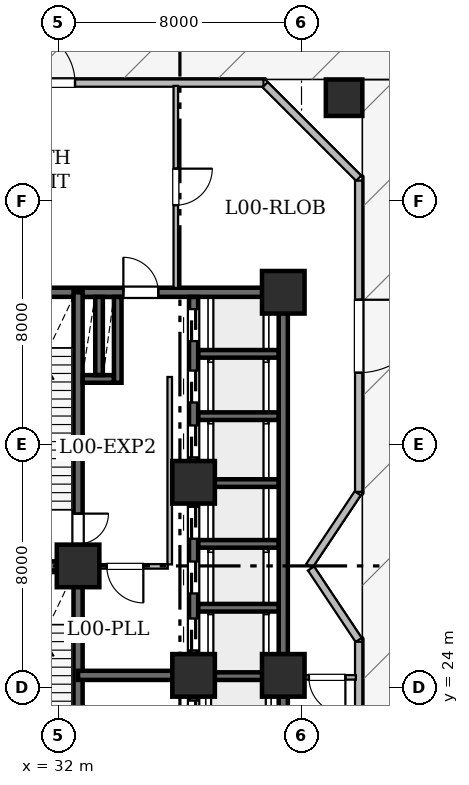
"""IFC4 building model, lengths in metres.
Left out: names, types, materials, properties, quantities, classifications, styles, units other than length and angle.
Written with IfcOpenShell. Run it as: python <this file> out.ifc"""

import sys

from ifc_helpers import new_model, si_unit, direction, frame, frame_2d, origin, origin_2d, place, context, subcontext, project, spatial, rectangle, hollow_rectangle, extrude, element, fill, save


model = new_model("IFC4")
c1 = context("Model", 3, precision=1e-05, world=origin(), true_north=direction((0.0, 1.0)))
c2 = subcontext(c1, "Body", "Model", "MODEL_VIEW")
j1 = project(units=[si_unit("LENGTHUNIT", "METRE"), si_unit("PLANEANGLEUNIT", "RADIAN")], contexts=[c1])
p1 = place(None, origin())
s1 = spatial("IfcSite", under=j1, at=p1, CompositionType="ELEMENT")
p2 = place(p1, origin())
s2 = spatial("IfcBuilding", under=s1, at=p2, CompositionType="ELEMENT")
p3 = place(p2, origin())
s3 = spatial("IfcBuildingStorey", under=s2, at=p3, CompositionType="ELEMENT", Elevation=0.0)
for number, where, z_axis, x_axis in (
    (1, (32.65, 28.0, 0.0), (0.0, 0.0, 1.0), (1.0, 0.0, 0.0)),
    (2, (36.45, 24.4, 0.0), (0.0, 0.0, 1.0), (1.0, 0.0, 0.0)),
    (3, (39.4, 24.4, 0.0), (0.0, 0.0, 1.0), (1.0, 0.0, 0.0)),
    (4, (36.45, 30.75, 0.0), (0.0, 0.0, 1.0), (1.0, 0.0, 0.0)),
    (5, (39.4, 37.0, 0.0), (0.0, 0.0, 1.0), (1.0, 0.0, 0.0)),
):
    element("IfcColumn", number, at=place(p3, frame(where, z_axis=z_axis, x_axis=x_axis)), inside=s3, PredefinedType="COLUMN", context=c2, shape_type="SweptSolid", body=[
        extrude(hollow_rectangle(XDim=1.4, YDim=1.4, WallThickness=0.07, at=origin_2d()), origin(), (0.0, 0.0, 1.0), 7.2),
    ])
p4 = place(p3, frame((41.4, 43.4, 0.0), z_axis=(0.0, 0.0, 1.0), x_axis=(1.0, 0.0, 0.0)))
e6 = element("IfcColumn", 6, at=p4, inside=s3, PredefinedType="COLUMN", context=c2, shape_type="SweptSolid", body=[
    extrude(hollow_rectangle(XDim=1.2, YDim=1.2, WallThickness=0.06, at=origin_2d()), origin(), (0.0, 0.0, 1.0), 7.2),
])
p5 = place(p3, frame((19.097, 43.88, 0.0), z_axis=(0.0, 0.0, 1.0), x_axis=(1.0, 0.0, 0.0)))
e7 = element("IfcWall", 7, at=p5, inside=s3, PredefinedType="STANDARD", context=c2, shape_type="SweptSolid", body=[
    extrude(rectangle(XDim=19.653, YDim=0.24, at=frame_2d((9.827, 0.0))), origin(), (0.0, 0.0, 1.0), 6.78),
])
p6 = place(p5, frame((11.653, 0.0, 0.0)))
e8 = element("IfcOpeningElement", 8, at=p6, cuts=e7, PredefinedType="OPENING", context=c2, shape_type="SweptSolid", body=[
    extrude(rectangle(XDim=1.8, YDim=2.2, at=frame_2d((0.9, 1.1))), frame((0.0, 0.13, 0.0), z_axis=(0.0, -1.0, 0.0), x_axis=(1.0, 0.0, 0.0)), (0.0, 0.0, 1.0), 0.26),
])
p7 = place(p5, frame((2.0, 0.0, 0.0)))
e9 = element("IfcOpeningElement", 9, at=p7, cuts=e7, PredefinedType="OPENING", context=c2, shape_type="SweptSolid", body=[
    extrude(rectangle(XDim=2.4, YDim=2.4, at=frame_2d((1.2, 1.2))), frame((0.0, 0.13, 0.0), z_axis=(0.0, -1.0, 0.0), x_axis=(1.0, 0.0, 0.0)), (0.0, 0.0, 1.0), 0.26),
])
p8 = place(p3, frame((38.803, 43.827, 0.0), z_axis=(0.0, 0.0, 1.0), x_axis=(0.707106781187, -0.707106781187, 0.0)))
e10 = element("IfcWall", 10, at=p8, inside=s3, PredefinedType="STANDARD", context=c2, shape_type="SweptSolid", body=[
    extrude(rectangle(XDim=4.351, YDim=0.24, at=frame_2d((2.176, 0.0))), origin(), (0.0, 0.0, 1.0), 6.78),
])
p9 = place(p3, frame((41.88, 40.672, 0.0), z_axis=(0.0, 0.0, 1.0), x_axis=(0.0, -1.0, 0.0)))
e11 = element("IfcWall", 11, at=p9, inside=s3, PredefinedType="STANDARD", context=c2, shape_type="SweptSolid", body=[
    extrude(rectangle(XDim=10.236, YDim=0.24, at=frame_2d((5.118, 0.0))), origin(), (0.0, 0.0, 1.0), 6.78),
])
p10 = place(p9, frame((3.918, 0.0, 0.0)))
e12 = element("IfcOpeningElement", 12, at=p10, cuts=e11, PredefinedType="OPENING", context=c2, shape_type="SweptSolid", body=[
    extrude(rectangle(XDim=2.4, YDim=2.4, at=frame_2d((1.2, 1.2))), frame((0.0, 0.13, 0.0), z_axis=(0.0, -1.0, 0.0), x_axis=(1.0, 0.0, 0.0)), (0.0, 0.0, 1.0), 0.26),
])
p11 = place(p3, frame((41.848, 30.388, 0.0), z_axis=(0.0, 0.0, 1.0), x_axis=(-0.55466093221, -0.83207646901, 0.0)))
e13 = element("IfcWall", 13, at=p11, inside=s3, PredefinedType="STANDARD", context=c2, shape_type="SweptSolid", body=[
    extrude(rectangle(XDim=2.87, YDim=0.24, at=frame_2d((1.435, 0.0))), origin(), (0.0, 0.0, 1.0), 6.78),
])
p12 = place(p3, frame((40.312, 27.916, 0.0), z_axis=(0.0, 0.0, 1.0), x_axis=(0.554660333073, -0.832076868394, 0.0)))
e14 = element("IfcWall", 14, at=p12, inside=s3, PredefinedType="STANDARD", context=c2, shape_type="SweptSolid", body=[
    extrude(rectangle(XDim=2.827, YDim=0.24, at=frame_2d((1.413, 0.0))), origin(), (0.0, 0.0, 1.0), 6.78),
])
p13 = place(p3, frame((41.88, 25.506, 0.0), z_axis=(0.0, 0.0, 1.0), x_axis=(0.0, -1.0, 0.0)))
e15 = element("IfcWall", 15, at=p13, inside=s3, PredefinedType="STANDARD", context=c2, shape_type="SweptSolid", body=[
    extrude(rectangle(XDim=10.256, YDim=0.24, at=frame_2d((5.128, 0.0))), origin(), (0.0, 0.0, 1.0), 6.78),
])
p14 = place(p3, frame((29.0, 37.0, 0.0), z_axis=(0.0, 0.0, 1.0), x_axis=(1.0, 0.0, 0.0)))
e16 = element("IfcWall", 16, at=p14, inside=s3, PredefinedType="SHEAR", context=c2, shape_type="SweptSolid", body=[
    extrude(rectangle(XDim=10.4, YDim=0.3, at=frame_2d((5.2, 0.0))), origin(), (0.0, 0.0, 1.0), 6.78),
])
p15 = place(p14, frame((5.14, 0.0, 0.0)))
e17 = element("IfcOpeningElement", 17, at=p15, cuts=e16, PredefinedType="OPENING", context=c2, shape_type="SweptSolid", body=[
    extrude(rectangle(XDim=1.15, YDim=2.2, at=frame_2d((0.575, 1.1))), frame((0.0, 0.16, 0.0), z_axis=(0.0, -1.0, 0.0), x_axis=(1.0, 0.0, 0.0)), (0.0, 0.0, 1.0), 0.32),
])
p16 = place(p3, frame((39.4, 19.0, 0.0), z_axis=(0.0, 0.0, 1.0), x_axis=(0.0, 1.0, 0.0)))
e18 = element("IfcWall", 18, at=p16, inside=s3, PredefinedType="SHEAR", context=c2, shape_type="SweptSolid", body=[
    extrude(rectangle(XDim=5.4, YDim=0.3, at=frame_2d((2.7, 0.0))), origin(), (0.0, 0.0, 1.0), 6.78),
])
p17 = place(p3, frame((39.4, 24.4, 0.0), z_axis=(0.0, 0.0, 1.0), x_axis=(0.0, 1.0, 0.0)))
e19 = element("IfcWall", 19, at=p17, inside=s3, PredefinedType="SHEAR", context=c2, shape_type="SweptSolid", body=[
    extrude(rectangle(XDim=12.6, YDim=0.3, at=frame_2d((6.3, 0.0))), origin(), (0.0, 0.0, 1.0), 6.78),
])
p18 = place(p3, frame((32.65, 28.0, 0.0), z_axis=(0.0, 0.0, 1.0), x_axis=(0.0, -1.0, 0.0)))
e20 = element("IfcWall", 20, at=p18, inside=s3, PredefinedType="SHEAR", context=c2, shape_type="SweptSolid", body=[
    extrude(rectangle(XDim=9.0, YDim=0.3, at=frame_2d((4.5, 0.0))), origin(), (0.0, 0.0, 1.0), 6.78),
])
p19 = place(p18, frame((7.28, 0.0, 0.0)))
e21 = element("IfcOpeningElement", 21, at=p19, cuts=e20, PredefinedType="OPENING", context=c2, shape_type="SweptSolid", body=[
    extrude(rectangle(XDim=1.0, YDim=2.15, at=frame_2d((0.5, 1.075))), frame((0.0, 0.16, 0.0), z_axis=(0.0, -1.0, 0.0), x_axis=(1.0, 0.0, 0.0)), (0.0, 0.0, 1.0), 0.32),
])
p20 = place(p3, frame((32.65, 37.0, 0.0), z_axis=(0.0, 0.0, 1.0), x_axis=(0.0, -1.0, 0.0)))
e22 = element("IfcWall", 22, at=p20, inside=s3, PredefinedType="SHEAR", context=c2, shape_type="SweptSolid", body=[
    extrude(rectangle(XDim=9.0, YDim=0.3, at=frame_2d((4.5, 0.0))), origin(), (0.0, 0.0, 1.0), 6.78),
])
p21 = place(p20, frame((7.28, 0.0, 0.0)))
e23 = element("IfcOpeningElement", 23, at=p21, cuts=e22, PredefinedType="OPENING", context=c2, shape_type="SweptSolid", body=[
    extrude(rectangle(XDim=1.0, YDim=2.15, at=frame_2d((0.5, 1.075))), frame((0.0, 0.16, 0.0), z_axis=(0.0, -1.0, 0.0), x_axis=(1.0, 0.0, 0.0)), (0.0, 0.0, 1.0), 0.32),
])
p22 = place(p3, frame((29.0, 28.0, 0.0), z_axis=(0.0, 0.0, 1.0), x_axis=(1.0, 0.0, 0.0)))
e24 = element("IfcWall", 24, at=p22, inside=s3, PredefinedType="SHEAR", context=c2, shape_type="SweptSolid", body=[
    extrude(rectangle(XDim=3.65, YDim=0.3, at=frame_2d((1.825, 0.0))), origin(), (0.0, 0.0, 1.0), 6.78),
])
p23 = place(p3, frame((32.65, 24.4, 0.0), z_axis=(0.0, 0.0, 1.0), x_axis=(1.0, 0.0, 0.0)))
e25 = element("IfcWall", 25, at=p23, inside=s3, PredefinedType="SHEAR", context=c2, shape_type="SweptSolid", body=[
    extrude(rectangle(XDim=3.8, YDim=0.3, at=frame_2d((1.9, 0.0))), origin(), (0.0, 0.0, 1.0), 6.78),
])
p24 = place(p3, frame((36.45, 19.154, 0.0), z_axis=(0.0, 0.0, 1.0), x_axis=(0.0, 1.0, 0.0)))
e26 = element("IfcWall", 26, at=p24, inside=s3, PredefinedType="SHEAR", context=c2, shape_type="SweptSolid", body=[
    extrude(rectangle(XDim=4.546, YDim=0.3, at=frame_2d((2.273, 0.0))), origin(), (0.0, 0.0, 1.0), 6.78),
])
p25 = place(p24, frame((0.696, 0.0, 0.0)))
e27 = element("IfcOpeningElement", 27, at=p25, cuts=e26, PredefinedType="OPENING", context=c2, shape_type="SweptSolid", body=[
    extrude(rectangle(XDim=1.1, YDim=2.15, at=frame_2d((0.55, 1.075))), frame((0.0, 0.16, 0.0), z_axis=(0.0, -1.0, 0.0), x_axis=(1.0, 0.0, 0.0)), (0.0, 0.0, 1.0), 0.32),
])
p26 = place(p24, frame((3.316, 0.0, 0.0)))
e28 = element("IfcOpeningElement", 28, at=p26, cuts=e26, PredefinedType="OPENING", context=c2, shape_type="SweptSolid", body=[
    extrude(rectangle(XDim=1.1, YDim=2.15, at=frame_2d((0.55, 1.075))), frame((0.0, 0.16, 0.0), z_axis=(0.0, -1.0, 0.0), x_axis=(1.0, 0.0, 0.0)), (0.0, 0.0, 1.0), 0.32),
])
p27 = place(p3, frame((36.45, 25.1, 0.0), z_axis=(0.0, 0.0, 1.0), x_axis=(0.0, 1.0, 0.0)))
e29 = element("IfcWall", 29, at=p27, inside=s3, PredefinedType="SHEAR", context=c2, shape_type="SweptSolid", body=[
    extrude(rectangle(XDim=4.95, YDim=0.3, at=frame_2d((2.475, 0.0))), origin(), (0.0, 0.0, 1.0), 6.78),
])
p28 = place(p27, frame((0.12, 0.0, 0.0)))
e30 = element("IfcOpeningElement", 30, at=p28, cuts=e29, PredefinedType="OPENING", context=c2, shape_type="SweptSolid", body=[
    extrude(rectangle(XDim=1.05, YDim=2.15, at=frame_2d((0.525, 1.075))), frame((0.0, 0.16, 0.0), z_axis=(0.0, -1.0, 0.0), x_axis=(1.0, 0.0, 0.0)), (0.0, 0.0, 1.0), 0.32),
])
p29 = place(p27, frame((1.995, 0.0, 0.0)))
e31 = element("IfcOpeningElement", 31, at=p29, cuts=e29, PredefinedType="OPENING", context=c2, shape_type="SweptSolid", body=[
    extrude(rectangle(XDim=1.05, YDim=2.15, at=frame_2d((0.525, 1.075))), frame((0.0, 0.16, 0.0), z_axis=(0.0, -1.0, 0.0), x_axis=(1.0, 0.0, 0.0)), (0.0, 0.0, 1.0), 0.32),
])
p30 = place(p27, frame((3.795, 0.0, 0.0)))
e32 = element("IfcOpeningElement", 32, at=p30, cuts=e29, PredefinedType="OPENING", context=c2, shape_type="SweptSolid", body=[
    extrude(rectangle(XDim=1.05, YDim=2.15, at=frame_2d((0.525, 1.075))), frame((0.0, 0.16, 0.0), z_axis=(0.0, -1.0, 0.0), x_axis=(1.0, 0.0, 0.0)), (0.0, 0.0, 1.0), 0.32),
])
p31 = place(p3, frame((36.45, 31.45, 0.0), z_axis=(0.0, 0.0, 1.0), x_axis=(0.0, 1.0, 0.0)))
e33 = element("IfcWall", 33, at=p31, inside=s3, PredefinedType="SHEAR", context=c2, shape_type="SweptSolid", body=[
    extrude(rectangle(XDim=5.396, YDim=0.3, at=frame_2d((2.698, 0.0))), origin(), (0.0, 0.0, 1.0), 6.78),
])
p32 = place(p31, frame((0.12, 0.0, 0.0)))
e34 = element("IfcOpeningElement", 34, at=p32, cuts=e33, PredefinedType="OPENING", context=c2, shape_type="SweptSolid", body=[
    extrude(rectangle(XDim=1.05, YDim=2.15, at=frame_2d((0.525, 1.075))), frame((0.0, 0.16, 0.0), z_axis=(0.0, -1.0, 0.0), x_axis=(1.0, 0.0, 0.0)), (0.0, 0.0, 1.0), 0.32),
])
p33 = place(p31, frame((1.925, 0.0, 0.0)))
e35 = element("IfcOpeningElement", 35, at=p33, cuts=e33, PredefinedType="OPENING", context=c2, shape_type="SweptSolid", body=[
    extrude(rectangle(XDim=1.05, YDim=2.15, at=frame_2d((0.525, 1.075))), frame((0.0, 0.16, 0.0), z_axis=(0.0, -1.0, 0.0), x_axis=(1.0, 0.0, 0.0)), (0.0, 0.0, 1.0), 0.32),
])
p34 = place(p31, frame((3.945, 0.0, 0.0)))
e36 = element("IfcOpeningElement", 36, at=p34, cuts=e33, PredefinedType="OPENING", context=c2, shape_type="SweptSolid", body=[
    extrude(rectangle(XDim=1.05, YDim=2.15, at=frame_2d((0.525, 1.075))), frame((0.0, 0.16, 0.0), z_axis=(0.0, -1.0, 0.0), x_axis=(1.0, 0.0, 0.0)), (0.0, 0.0, 1.0), 0.32),
])
for number, where, z_axis, x_axis in (
    (37, (36.604, 24.375, 0.0), (0.0, 0.0, 1.0), (1.0, 0.0, 0.0)),
    (38, (36.604, 26.625, 0.0), (0.0, 0.0, 1.0), (1.0, 0.0, 0.0)),
    (39, (36.604, 28.725, 0.0), (0.0, 0.0, 1.0), (1.0, 0.0, 0.0)),
    (40, (36.604, 30.725, 0.0), (0.0, 0.0, 1.0), (1.0, 0.0, 0.0)),
    (41, (36.604, 32.925, 0.0), (0.0, 0.0, 1.0), (1.0, 0.0, 0.0)),
    (42, (36.604, 34.975, 0.0), (0.0, 0.0, 1.0), (1.0, 0.0, 0.0)),
):
    element("IfcWall", number, at=place(p3, frame(where, z_axis=z_axis, x_axis=x_axis)), inside=s3, PredefinedType="SHEAR", context=c2, shape_type="SweptSolid", body=[
        extrude(rectangle(XDim=2.642, YDim=0.25, at=frame_2d((1.321, 0.0))), origin(), (0.0, 0.0, 1.0), 6.78),
    ])
p35 = place(p3, frame((33.955, 34.025, 0.0), z_axis=(0.0, 0.0, 1.0), x_axis=(0.0, 1.0, 0.0)))
e43 = element("IfcWall", 43, at=p35, inside=s3, PredefinedType="SHEAR", context=c2, shape_type="SweptSolid", body=[
    extrude(rectangle(XDim=2.821, YDim=0.25, at=frame_2d((1.411, 0.0))), origin(), (0.0, 0.0, 1.0), 6.78),
])
p36 = place(p3, frame((32.804, 34.15, 0.0), z_axis=(0.0, 0.0, 1.0), x_axis=(1.0, 0.0, 0.0)))
e44 = element("IfcWall", 44, at=p36, inside=s3, PredefinedType="SHEAR", context=c2, shape_type="SweptSolid", body=[
    extrude(rectangle(XDim=1.022, YDim=0.25, at=frame_2d((0.511, 0.0))), origin(), (0.0, 0.0, 1.0), 6.78),
])
p37 = place(p3, frame((33.34, 34.279, 0.0), z_axis=(0.0, 0.0, 1.0), x_axis=(0.0, 1.0, 0.0)))
e45 = element("IfcWall", 45, at=p37, inside=s3, PredefinedType="SHEAR", context=c2, shape_type="SweptSolid", body=[
    extrude(rectangle(XDim=2.567, YDim=0.25, at=frame_2d((1.283, 0.0))), origin(), (0.0, 0.0, 1.0), 6.78),
])
p38 = place(p3, frame((35.665, 34.214, 0.0), z_axis=(0.0, 0.0, 1.0), x_axis=(0.0, -1.0, 0.0)))
e46 = element("IfcWall", 46, at=p38, inside=s3, PredefinedType="STANDARD", context=c2, shape_type="SweptSolid", body=[
    extrude(rectangle(XDim=6.164, YDim=0.15, at=frame_2d((3.082, 0.0))), origin(), (0.0, 0.0, 1.0), 6.78),
])
p39 = place(p3, frame((35.6, 27.985, 0.0), z_axis=(0.0, 0.0, 1.0), x_axis=(-1.0, 0.0, 0.0)))
e47 = element("IfcWall", 47, at=p39, inside=s3, PredefinedType="STANDARD", context=c2, shape_type="SweptSolid", body=[
    extrude(rectangle(XDim=2.806, YDim=0.15, at=frame_2d((1.403, 0.0))), origin(), (0.0, 0.0, 1.0), 6.237),
])
p40 = place(p39, frame((0.803, 0.0, 0.0)))
e48 = element("IfcOpeningElement", 48, at=p40, cuts=e47, PredefinedType="OPENING", context=c2, shape_type="SweptSolid", body=[
    extrude(rectangle(XDim=1.2, YDim=2.15, at=frame_2d((0.6, 1.075))), frame((0.0, 0.085, 0.0), z_axis=(0.0, -1.0, 0.0), x_axis=(1.0, 0.0, 0.0)), (0.0, 0.0, 1.0), 0.17),
])
p41 = place(p3, frame((35.865, 43.788, 0.0), z_axis=(0.0, 0.0, 1.0), x_axis=(0.0, -1.0, 0.0)))
e49 = element("IfcWall", 49, at=p41, inside=s3, PredefinedType="STANDARD", context=c2, shape_type="SweptSolid", body=[
    extrude(rectangle(XDim=6.644, YDim=0.15, at=frame_2d((3.322, 0.0))), origin(), (0.0, 0.0, 1.0), 5.915),
])
p42 = place(p41, frame((2.722, 0.0, 0.0)))
e50 = element("IfcOpeningElement", 50, at=p42, cuts=e49, PredefinedType="OPENING", context=c2, shape_type="SweptSolid", body=[
    extrude(rectangle(XDim=1.2, YDim=2.15, at=frame_2d((0.6, 1.075))), frame((0.0, 0.085, 0.0), z_axis=(0.0, -1.0, 0.0), x_axis=(1.0, 0.0, 0.0)), (0.0, 0.0, 1.0), 0.17),
])
p43 = place(p3, frame((41.788, 24.335, 0.0), z_axis=(0.0, 0.0, 1.0), x_axis=(-1.0, 0.0, 0.0)))
e51 = element("IfcWall", 51, at=p43, inside=s3, PredefinedType="STANDARD", context=c2, shape_type="SweptSolid", body=[
    extrude(rectangle(XDim=2.244, YDim=0.15, at=frame_2d((1.122, 0.0))), origin(), (0.0, 0.0, 1.0), 5.915),
])
p44 = place(p43, frame((0.345, 0.0, 0.0)))
e52 = element("IfcOpeningElement", 52, at=p44, cuts=e51, PredefinedType="OPENING", context=c2, shape_type="SweptSolid", body=[
    extrude(rectangle(XDim=1.2, YDim=2.15, at=frame_2d((0.6, 1.075))), frame((0.0, 0.085, 0.0), z_axis=(0.0, -1.0, 0.0), x_axis=(1.0, 0.0, 0.0)), (0.0, 0.0, 1.0), 0.17),
])
p45 = place(p6, origin())
e53 = element("IfcDoor", 53, at=p45, inside=s3, OperationType="SINGLE_SWING_LEFT", PredefinedType="DOOR", context=c2, shape_type="SweptSolid", body=[
    extrude(rectangle(XDim=1.8, YDim=2.2, at=frame_2d((0.9, 1.1))), frame((0.0, 0.025, 0.0), z_axis=(0.0, -1.0, 0.0), x_axis=(1.0, 0.0, 0.0)), (0.0, 0.0, 1.0), 0.05),
])
fill(e8, e53)
p46 = place(p10, origin())
e54 = element("IfcDoor", 54, at=p46, inside=s3, OperationType="SINGLE_SWING_LEFT", PredefinedType="DOOR", context=c2, shape_type="SweptSolid", body=[
    extrude(rectangle(XDim=2.4, YDim=2.4, at=frame_2d((1.2, 1.2))), frame((0.0, 0.025, 0.0), z_axis=(0.0, -1.0, 0.0), x_axis=(1.0, 0.0, 0.0)), (0.0, 0.0, 1.0), 0.05),
])
fill(e12, e54)
p47 = place(p21, origin())
e55 = element("IfcDoor", 55, at=p47, inside=s3, OperationType="SINGLE_SWING_LEFT", PredefinedType="DOOR", context=c2, shape_type="SweptSolid", body=[
    extrude(rectangle(XDim=1.0, YDim=2.15, at=frame_2d((0.5, 1.075))), frame((0.0, 0.025, 0.0), z_axis=(0.0, -1.0, 0.0), x_axis=(1.0, 0.0, 0.0)), (0.0, 0.0, 1.0), 0.05),
])
fill(e23, e55)
p48 = place(p15, origin())
e56 = element("IfcDoor", 56, at=p48, inside=s3, OperationType="SINGLE_SWING_LEFT", PredefinedType="DOOR", context=c2, shape_type="SweptSolid", body=[
    extrude(rectangle(XDim=1.15, YDim=2.2, at=frame_2d((0.575, 1.1))), frame((0.0, 0.025, 0.0), z_axis=(0.0, -1.0, 0.0), x_axis=(1.0, 0.0, 0.0)), (0.0, 0.0, 1.0), 0.05),
])
fill(e17, e56)
p49 = place(p26, origin())
e57 = element("IfcDoor", 57, at=p49, inside=s3, OperationType="SLIDING_TO_LEFT", PredefinedType="DOOR", context=c2, shape_type="SweptSolid", body=[
    extrude(rectangle(XDim=1.1, YDim=2.15, at=frame_2d((0.55, 1.075))), frame((0.0, 0.025, 0.0), z_axis=(0.0, -1.0, 0.0), x_axis=(1.0, 0.0, 0.0)), (0.0, 0.0, 1.0), 0.05),
])
fill(e28, e57)
p50 = place(p28, origin())
e58 = element("IfcDoor", 58, at=p50, inside=s3, OperationType="SLIDING_TO_LEFT", PredefinedType="DOOR", context=c2, shape_type="SweptSolid", body=[
    extrude(rectangle(XDim=1.05, YDim=2.15, at=frame_2d((0.525, 1.075))), frame((0.0, 0.025, 0.0), z_axis=(0.0, -1.0, 0.0), x_axis=(1.0, 0.0, 0.0)), (0.0, 0.0, 1.0), 0.05),
])
fill(e30, e58)
p51 = place(p29, origin())
e59 = element("IfcDoor", 59, at=p51, inside=s3, OperationType="SLIDING_TO_LEFT", PredefinedType="DOOR", context=c2, shape_type="SweptSolid", body=[
    extrude(rectangle(XDim=1.05, YDim=2.15, at=frame_2d((0.525, 1.075))), frame((0.0, 0.025, 0.0), z_axis=(0.0, -1.0, 0.0), x_axis=(1.0, 0.0, 0.0)), (0.0, 0.0, 1.0), 0.05),
])
fill(e31, e59)
p52 = place(p30, origin())
e60 = element("IfcDoor", 60, at=p52, inside=s3, OperationType="SLIDING_TO_LEFT", PredefinedType="DOOR", context=c2, shape_type="SweptSolid", body=[
    extrude(rectangle(XDim=1.05, YDim=2.15, at=frame_2d((0.525, 1.075))), frame((0.0, 0.025, 0.0), z_axis=(0.0, -1.0, 0.0), x_axis=(1.0, 0.0, 0.0)), (0.0, 0.0, 1.0), 0.05),
])
fill(e32, e60)
p53 = place(p32, origin())
e61 = element("IfcDoor", 61, at=p53, inside=s3, OperationType="SLIDING_TO_LEFT", PredefinedType="DOOR", context=c2, shape_type="SweptSolid", body=[
    extrude(rectangle(XDim=1.05, YDim=2.15, at=frame_2d((0.525, 1.075))), frame((0.0, 0.025, 0.0), z_axis=(0.0, -1.0, 0.0), x_axis=(1.0, 0.0, 0.0)), (0.0, 0.0, 1.0), 0.05),
])
fill(e34, e61)
p54 = place(p33, origin())
e62 = element("IfcDoor", 62, at=p54, inside=s3, OperationType="SLIDING_TO_LEFT", PredefinedType="DOOR", context=c2, shape_type="SweptSolid", body=[
    extrude(rectangle(XDim=1.05, YDim=2.15, at=frame_2d((0.525, 1.075))), frame((0.0, 0.025, 0.0), z_axis=(0.0, -1.0, 0.0), x_axis=(1.0, 0.0, 0.0)), (0.0, 0.0, 1.0), 0.05),
])
fill(e35, e62)
p55 = place(p34, origin())
e63 = element("IfcDoor", 63, at=p55, inside=s3, OperationType="SLIDING_TO_LEFT", PredefinedType="DOOR", context=c2, shape_type="SweptSolid", body=[
    extrude(rectangle(XDim=1.05, YDim=2.15, at=frame_2d((0.525, 1.075))), frame((0.0, 0.025, 0.0), z_axis=(0.0, -1.0, 0.0), x_axis=(1.0, 0.0, 0.0)), (0.0, 0.0, 1.0), 0.05),
])
fill(e36, e63)
p56 = place(p40, origin())
e64 = element("IfcDoor", 64, at=p56, inside=s3, OperationType="SINGLE_SWING_LEFT", PredefinedType="DOOR", context=c2, shape_type="SweptSolid", body=[
    extrude(rectangle(XDim=1.2, YDim=2.15, at=frame_2d((0.6, 1.075))), frame((0.0, 0.025, 0.0), z_axis=(0.0, -1.0, 0.0), x_axis=(1.0, 0.0, 0.0)), (0.0, 0.0, 1.0), 0.05),
])
fill(e48, e64)
p57 = place(p42, origin())
e65 = element("IfcDoor", 65, at=p57, inside=s3, OperationType="SINGLE_SWING_LEFT", PredefinedType="DOOR", context=c2, shape_type="SweptSolid", body=[
    extrude(rectangle(XDim=1.2, YDim=2.15, at=frame_2d((0.6, 1.075))), frame((0.0, 0.025, 0.0), z_axis=(0.0, -1.0, 0.0), x_axis=(1.0, 0.0, 0.0)), (0.0, 0.0, 1.0), 0.05),
])
fill(e50, e65)
p58 = place(p44, origin())
e66 = element("IfcDoor", 66, at=p58, inside=s3, OperationType="SINGLE_SWING_LEFT", PredefinedType="DOOR", context=c2, shape_type="SweptSolid", body=[
    extrude(rectangle(XDim=1.2, YDim=2.15, at=frame_2d((0.6, 1.075))), frame((0.0, 0.025, 0.0), z_axis=(0.0, -1.0, 0.0), x_axis=(1.0, 0.0, 0.0)), (0.0, 0.0, 1.0), 0.05),
])
fill(e52, e66)
save(model, sys.argv[1])
